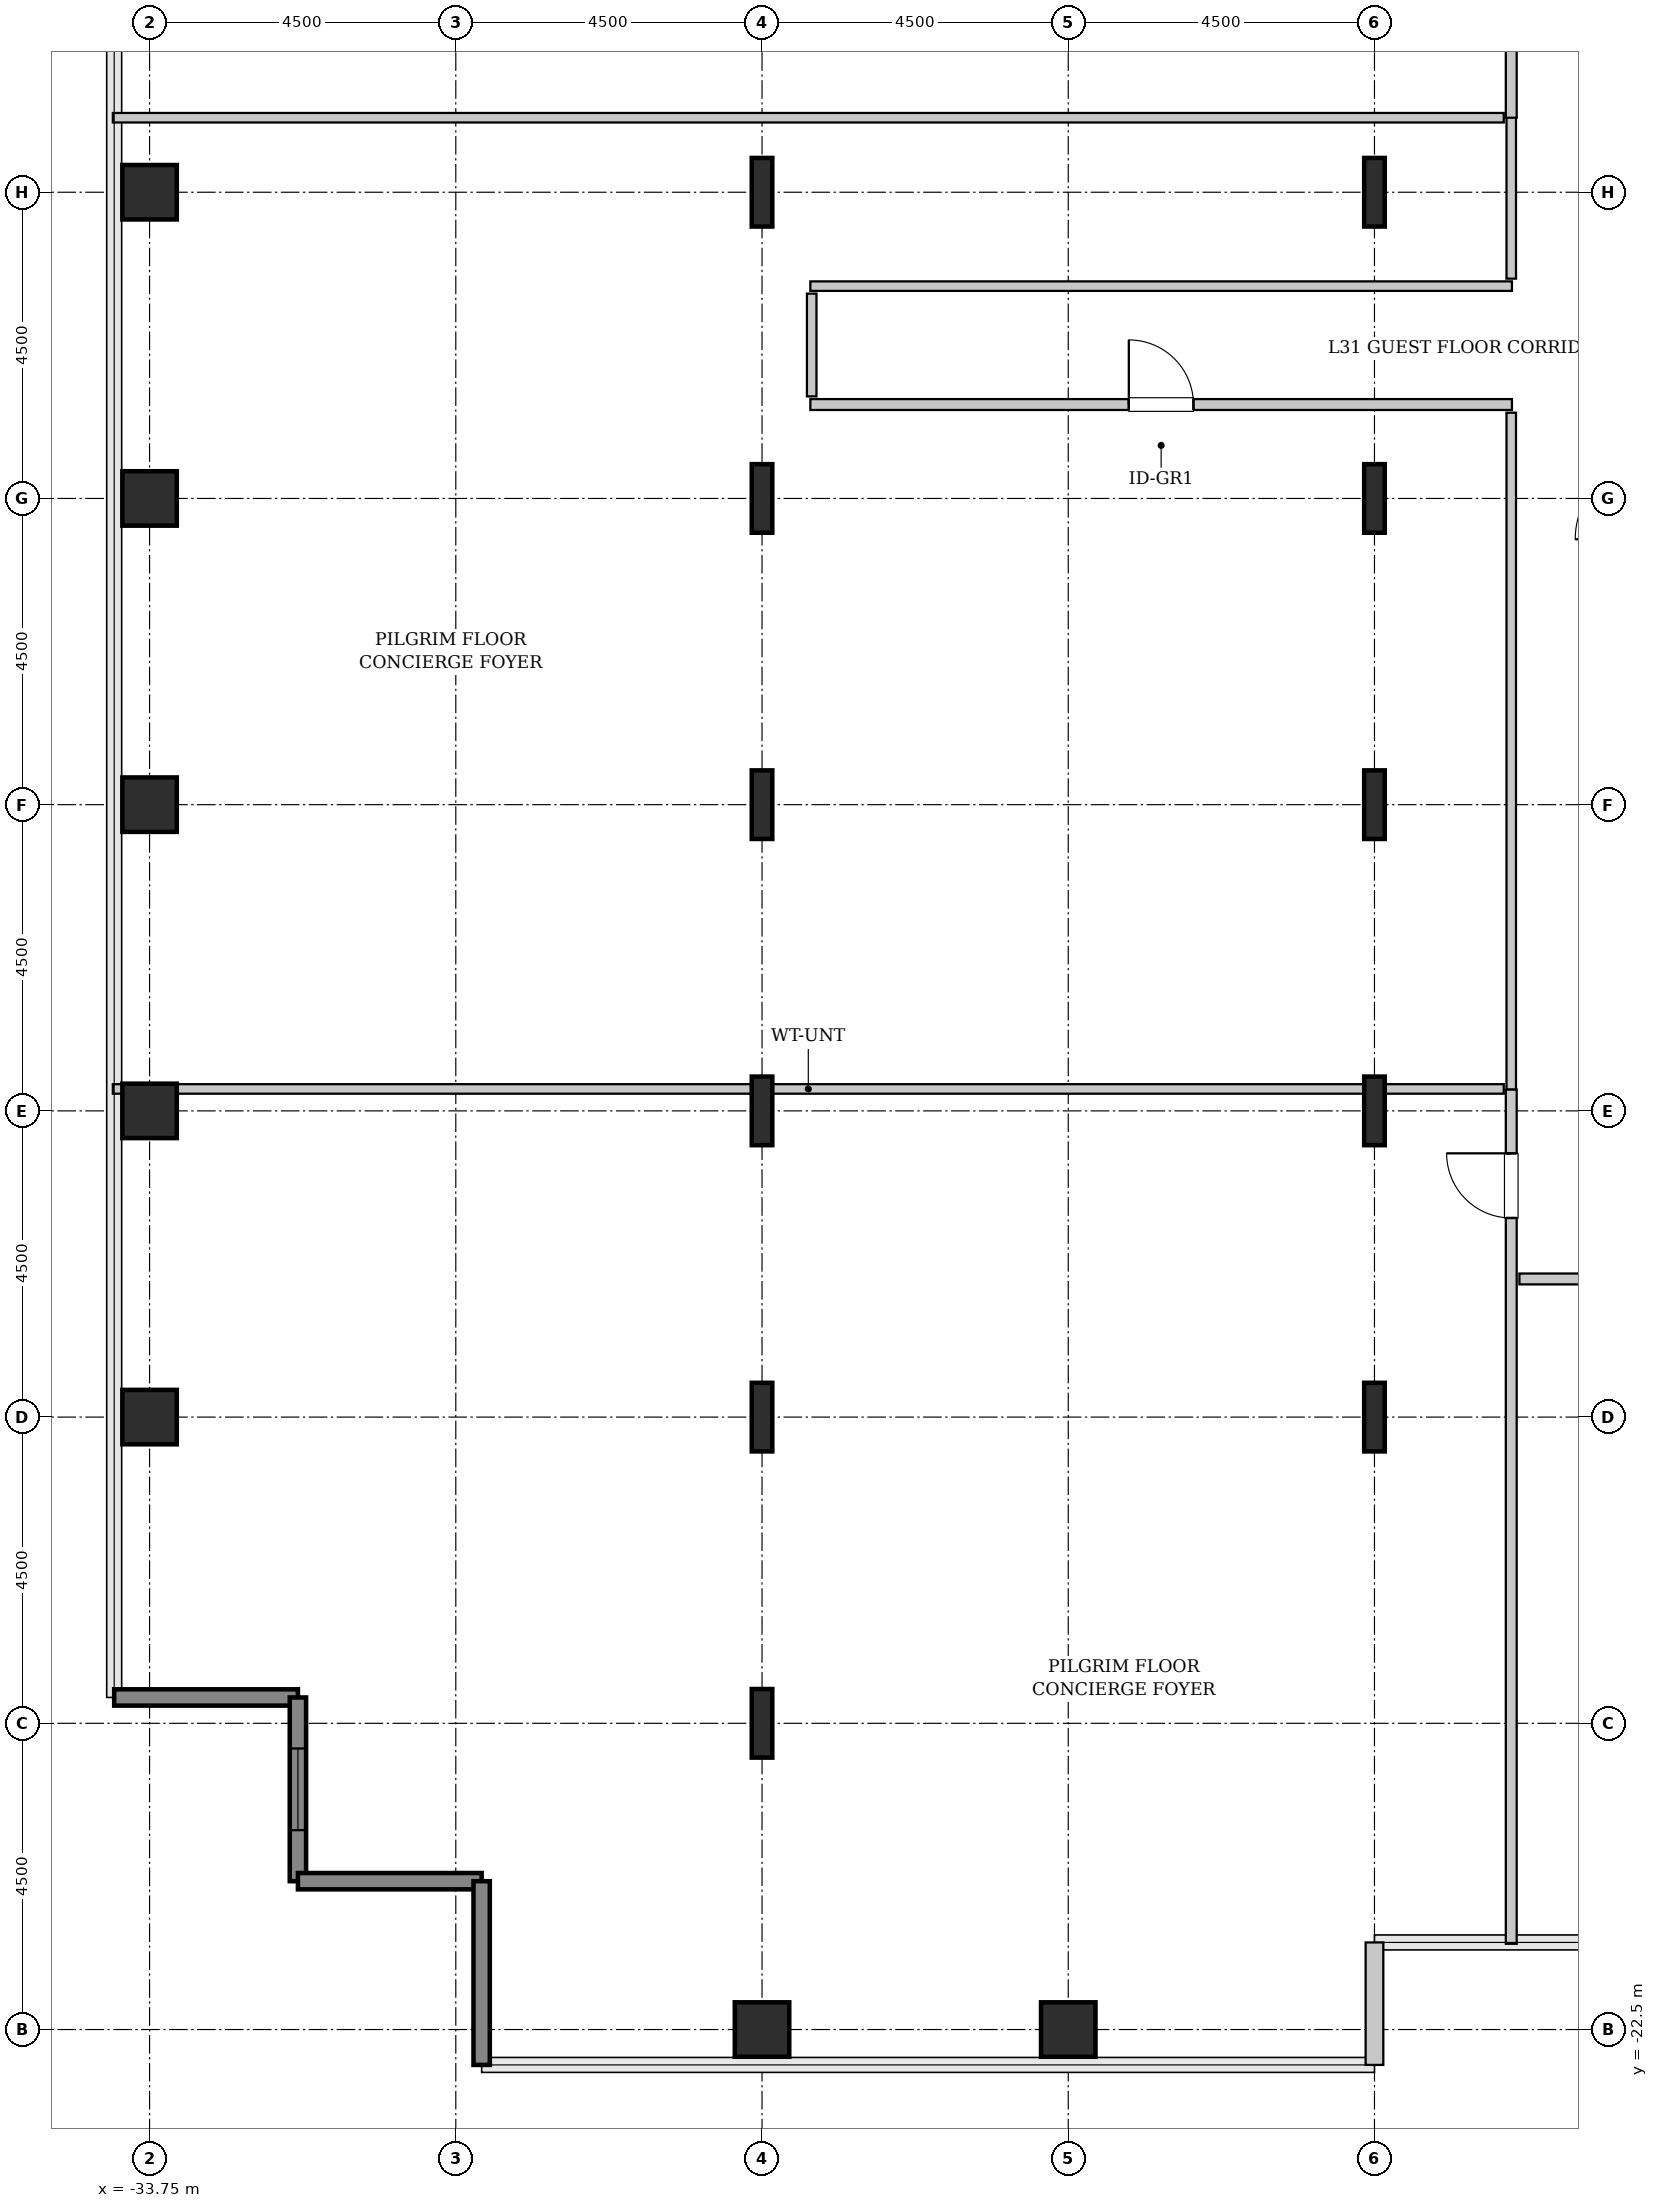
"""IFC4 building model, lengths in metres.
Left out: names, types, materials, properties, quantities, classifications, styles, units other than length and angle.
Written with IfcOpenShell. Run it as: python <this file> out.ifc"""

import sys

from ifc_helpers import new_model, si_unit, direction, frame, frame_2d, origin, origin_2d, place, context, subcontext, project, spatial, rectangle, hollow_rectangle, i_section, extrude, source, transform, mapped, element, fill, save


model = new_model("IFC4")
c1 = context("Model", 3, precision=1e-05, world=origin(), true_north=direction((0.0, 1.0)))
c2 = subcontext(c1, "Body", "Model", "MODEL_VIEW")
j1 = project(units=[si_unit("LENGTHUNIT", "METRE"), si_unit("PLANEANGLEUNIT", "RADIAN")], contexts=[c1])
p1 = place(None, origin())
s1 = spatial("IfcSite", under=j1, at=p1, CompositionType="ELEMENT")
p2 = place(p1, origin())
s2 = spatial("IfcBuilding", under=s1, at=p2, CompositionType="ELEMENT")
p3 = place(p2, frame((0.0, 0.0, 128.8)))
s3 = spatial("IfcBuildingStorey", under=s2, at=p3, CompositionType="ELEMENT", Elevation=128.8)
m1 = source(origin(), c2, "Body", "SweptSolid", [
    extrude(hollow_rectangle(XDim=0.8, YDim=0.8, WallThickness=0.04, InnerFilletRadius=0.04, OuterFilletRadius=0.08, at=origin_2d()), origin(), (0.0, 0.0, 1.0), 3.8),
])
for number, where, z_axis, x_axis in (
    (1, (-33.75, -13.5, 0.0), (0.0, 0.0, 1.0), (1.0, 0.0, 0.0)),
    (2, (-33.75, -9.0, 0.0), (0.0, 0.0, 1.0), (1.0, 0.0, 0.0)),
    (3, (-33.75, -4.5, 0.0), (0.0, 0.0, 1.0), (1.0, 0.0, 0.0)),
    (4, (-33.75, 0.0, 0.0), (0.0, 0.0, 1.0), (1.0, 0.0, 0.0)),
    (5, (-33.75, 4.5, 0.0), (0.0, 0.0, 1.0), (1.0, 0.0, 0.0)),
    (6, (-24.75, -22.5, 0.0), (0.0, 0.0, 1.0), (1.0, 0.0, 0.0)),
):
    element("IfcColumn", number, at=place(p3, frame(where, z_axis=z_axis, x_axis=x_axis)), inside=s3, PredefinedType="COLUMN", context=c2, shape_type="MappedRepresentation", body=[
        mapped(m1, transform((0.0, 0.0, 0.0), x_axis=(1.0, 0.0, 0.0), y_axis=(0.0, 1.0, 0.0), z_axis=(0.0, 0.0, 1.0), scale=1.0)),
    ])
m2 = source(origin(), c2, "Body", "SweptSolid", [
    extrude(i_section(OverallWidth=0.302, OverallDepth=1.008, WebThickness=0.021, FlangeThickness=0.04, FilletRadius=0.03, at=origin_2d()), origin(), (0.0, 0.0, 1.0), 3.8),
])
for number, where, z_axis, x_axis in (
    (7, (-24.75, -18.0, 0.0), (0.0, 0.0, 1.0), (1.0, 0.0, 0.0)),
    (8, (-24.75, -13.5, 0.0), (0.0, 0.0, 1.0), (1.0, 0.0, 0.0)),
    (9, (-24.75, -9.0, 0.0), (0.0, 0.0, 1.0), (1.0, 0.0, 0.0)),
    (10, (-24.75, -4.5, 0.0), (0.0, 0.0, 1.0), (1.0, 0.0, 0.0)),
    (11, (-24.75, 0.0, 0.0), (0.0, 0.0, 1.0), (1.0, 0.0, 0.0)),
    (12, (-24.75, 4.5, 0.0), (0.0, 0.0, 1.0), (1.0, 0.0, 0.0)),
):
    element("IfcColumn", number, at=place(p3, frame(where, z_axis=z_axis, x_axis=x_axis)), inside=s3, PredefinedType="COLUMN", context=c2, shape_type="MappedRepresentation", body=[
        mapped(m2, transform((0.0, 0.0, 0.0), x_axis=(1.0, 0.0, 0.0), y_axis=(0.0, 1.0, 0.0), z_axis=(0.0, 0.0, 1.0), scale=1.0)),
    ])
p4 = place(p3, frame((-20.25, -22.5, 0.0), z_axis=(0.0, 0.0, 1.0), x_axis=(1.0, 0.0, 0.0)))
e13 = element("IfcColumn", 13, at=p4, inside=s3, PredefinedType="COLUMN", context=c2, shape_type="MappedRepresentation", body=[
    mapped(m1, transform((0.0, 0.0, 0.0), x_axis=(1.0, 0.0, 0.0), y_axis=(0.0, 1.0, 0.0), z_axis=(0.0, 0.0, 1.0), scale=1.0)),
])
for number, where, z_axis, x_axis in (
    (14, (-15.75, -13.5, 0.0), (0.0, 0.0, 1.0), (1.0, 0.0, 0.0)),
    (15, (-15.75, -9.0, 0.0), (0.0, 0.0, 1.0), (1.0, 0.0, 0.0)),
    (16, (-15.75, -4.5, 0.0), (0.0, 0.0, 1.0), (1.0, 0.0, 0.0)),
    (17, (-15.75, 0.0, 0.0), (0.0, 0.0, 1.0), (1.0, 0.0, 0.0)),
    (18, (-15.75, 4.5, 0.0), (0.0, 0.0, 1.0), (1.0, 0.0, 0.0)),
):
    element("IfcColumn", number, at=place(p3, frame(where, z_axis=z_axis, x_axis=x_axis)), inside=s3, PredefinedType="COLUMN", context=c2, shape_type="MappedRepresentation", body=[
        mapped(m2, transform((0.0, 0.0, 0.0), x_axis=(1.0, 0.0, 0.0), y_axis=(0.0, 1.0, 0.0), z_axis=(0.0, 0.0, 1.0), scale=1.0)),
    ])
m3 = source(origin(), c2, "Body", "SweptSolid", [
    extrude(rectangle(XDim=2.7, YDim=0.24, at=frame_2d((1.35, 0.0))), origin(), (0.0, 0.0, 1.0), 3.55),
])
p5 = place(p3, frame((-34.27, -17.62, 0.0), z_axis=(0.0, 0.0, 1.0), x_axis=(1.0, 0.0, 0.0)))
e19 = element("IfcWall", 19, at=p5, inside=s3, PredefinedType="SHEAR", context=c2, shape_type="MappedRepresentation", body=[
    mapped(m3, transform((0.0, 0.0, 0.0), x_axis=(1.0, 0.0, 0.0), y_axis=(0.0, 1.0, 0.0), z_axis=(0.0, 0.0, 1.0), scale=1.0)),
])
p6 = place(p3, frame((-31.57, -17.62, 0.0), z_axis=(0.0, 0.0, 1.0), x_axis=(0.0, -1.0, 0.0)))
e20 = element("IfcWall", 20, at=p6, inside=s3, PredefinedType="SHEAR", context=c2, shape_type="MappedRepresentation", body=[
    mapped(m3, transform((0.0, 0.0, 0.0), x_axis=(1.0, 0.0, 0.0), y_axis=(0.0, 1.0, 0.0), z_axis=(0.0, 0.0, 1.0), scale=1.0)),
])
p7 = place(p6, frame((0.75, 0.0, 0.85)))
e21 = element("IfcOpeningElement", 21, at=p7, cuts=e20, PredefinedType="OPENING", context=c2, shape_type="SweptSolid", body=[
    extrude(rectangle(XDim=1.2, YDim=1.8, at=frame_2d((0.6, 0.9))), frame((0.0, 0.13, 0.0), z_axis=(0.0, -1.0, 0.0), x_axis=(1.0, 0.0, 0.0)), (0.0, 0.0, 1.0), 0.26),
])
for number, where, z_axis, x_axis in (
    (22, (-31.57, -20.32, 0.0), (0.0, 0.0, 1.0), (1.0, 0.0, 0.0)),
    (23, (-28.87, -20.32, 0.0), (0.0, 0.0, 1.0), (0.0, -1.0, 0.0)),
):
    element("IfcWall", number, at=place(p3, frame(where, z_axis=z_axis, x_axis=x_axis)), inside=s3, PredefinedType="SHEAR", context=c2, shape_type="MappedRepresentation", body=[
        mapped(m3, transform((0.0, 0.0, 0.0), x_axis=(1.0, 0.0, 0.0), y_axis=(0.0, 1.0, 0.0), z_axis=(0.0, 0.0, 1.0), scale=1.0)),
    ])
m4 = source(origin(), c2, "Body", "SweptSolid", [
    extrude(rectangle(XDim=1.8, YDim=0.26, at=frame_2d((0.9, 0.0))), origin(), (0.0, 0.0, 1.0), 3.55),
])
p8 = place(p3, frame((-15.75, -23.02, 0.0), z_axis=(0.0, 0.0, 1.0), x_axis=(0.0, 1.0, 0.0)))
e24 = element("IfcWall", 24, at=p8, inside=s3, PredefinedType="SOLIDWALL", context=c2, shape_type="MappedRepresentation", body=[
    mapped(m4, transform((0.0, 0.0, 0.0), x_axis=(1.0, 0.0, 0.0), y_axis=(0.0, 1.0, 0.0), z_axis=(0.0, 0.0, 1.0), scale=1.0)),
])
m5 = source(origin(), c2, "Body", "SweptSolid", [
    extrude(rectangle(XDim=10.31, YDim=0.16, at=frame_2d((5.155, 0.0))), origin(), (0.0, 0.0, 1.0), 3.535),
])
p9 = place(p3, frame((-24.04, 1.38, 0.0), z_axis=(0.0, 0.0, 1.0), x_axis=(1.0, 0.0, 0.0)))
e25 = element("IfcWall", 25, at=p9, inside=s3, PredefinedType="PARTITIONING", context=c2, shape_type="MappedRepresentation", body=[
    mapped(m5, transform((0.0, 0.0, 0.0), x_axis=(1.0, 0.0, 0.0), y_axis=(0.0, 1.0, 0.0), z_axis=(0.0, 0.0, 1.0), scale=1.0)),
])
p10 = place(p9, frame((4.68, 0.0, 0.0)))
e26 = element("IfcOpeningElement", 26, at=p10, cuts=e25, PredefinedType="OPENING", context=c2, shape_type="SweptSolid", body=[
    extrude(rectangle(XDim=0.95, YDim=2.1, at=frame_2d((0.475, 1.05))), frame((0.0, 0.09, 0.0), z_axis=(0.0, -1.0, 0.0), x_axis=(1.0, 0.0, 0.0)), (0.0, 0.0, 1.0), 0.18),
])
m6 = source(origin(), c2, "Body", "SweptSolid", [
    extrude(rectangle(XDim=10.31, YDim=0.14, at=frame_2d((5.155, 0.0))), origin(), (0.0, 0.0, 1.0), 3.535),
])
p11 = place(p3, frame((-24.04, 3.12, 0.0), z_axis=(0.0, 0.0, 1.0), x_axis=(1.0, 0.0, 0.0)))
e27 = element("IfcWall", 27, at=p11, inside=s3, PredefinedType="PARTITIONING", context=c2, shape_type="MappedRepresentation", body=[
    mapped(m6, transform((0.0, 0.0, 0.0), x_axis=(1.0, 0.0, 0.0), y_axis=(0.0, 1.0, 0.0), z_axis=(0.0, 0.0, 1.0), scale=1.0)),
])
m7 = source(origin(), c2, "Body", "SweptSolid", [
    extrude(rectangle(XDim=9.948, YDim=0.14, at=frame_2d((4.974, 0.0))), origin(), (0.0, 0.0, 1.0), 3.535),
])
p12 = place(p3, frame((-13.74, -8.688, 0.0), z_axis=(0.0, 0.0, 1.0), x_axis=(0.0, 1.0, 0.0)))
e28 = element("IfcWall", 28, at=p12, inside=s3, PredefinedType="PARTITIONING", context=c2, shape_type="MappedRepresentation", body=[
    mapped(m7, transform((0.0, 0.0, 0.0), x_axis=(1.0, 0.0, 0.0), y_axis=(0.0, 1.0, 0.0), z_axis=(0.0, 0.0, 1.0), scale=1.0)),
])
m8 = source(origin(), c2, "Body", "SweptSolid", [
    extrude(rectangle(XDim=2.375, YDim=0.14, at=frame_2d((1.188, 0.0))), origin(), (0.0, 0.0, 1.0), 3.535),
])
p13 = place(p3, frame((-13.74, 3.23, 0.0), z_axis=(0.0, 0.0, 1.0), x_axis=(0.0, 1.0, 0.0)))
e29 = element("IfcWall", 29, at=p13, inside=s3, PredefinedType="PARTITIONING", context=c2, shape_type="MappedRepresentation", body=[
    mapped(m8, transform((0.0, 0.0, 0.0), x_axis=(1.0, 0.0, 0.0), y_axis=(0.0, 1.0, 0.0), z_axis=(0.0, 0.0, 1.0), scale=1.0)),
])
m9 = source(origin(), c2, "Body", "SweptSolid", [
    extrude(rectangle(XDim=1.51, YDim=0.14, at=frame_2d((0.755, 0.0))), origin(), (0.0, 0.0, 1.0), 3.535),
])
p14 = place(p3, frame((-24.02, 1.5, 0.0), z_axis=(0.0, 0.0, 1.0), x_axis=(0.0, 1.0, 0.0)))
e30 = element("IfcWall", 30, at=p14, inside=s3, PredefinedType="PARTITIONING", context=c2, shape_type="MappedRepresentation", body=[
    mapped(m9, transform((0.0, 0.0, 0.0), x_axis=(1.0, 0.0, 0.0), y_axis=(0.0, 1.0, 0.0), z_axis=(0.0, 0.0, 1.0), scale=1.0)),
])
m10 = source(origin(), c2, "Body", "SweptSolid", [
    extrude(rectangle(XDim=20.44, YDim=0.14, at=frame_2d((10.22, 0.0))), origin(), (0.0, 0.0, 1.0), 2.875),
])
p15 = place(p3, frame((-34.29, -8.677, 0.0), z_axis=(0.0, 0.0, 1.0), x_axis=(1.0, 0.0, 0.0)))
e31 = element("IfcWall", 31, at=p15, inside=s3, PredefinedType="PARTITIONING", context=c2, shape_type="MappedRepresentation", body=[
    mapped(m10, transform((0.0, 0.0, 0.0), x_axis=(1.0, 0.0, 0.0), y_axis=(0.0, 1.0, 0.0), z_axis=(0.0, 0.0, 1.0), scale=1.0)),
])
m11 = source(origin(), c2, "Body", "SweptSolid", [
    extrude(rectangle(XDim=20.44, YDim=0.14, at=frame_2d((10.22, 0.0))), origin(), (0.0, 0.0, 1.0), 3.535),
])
p16 = place(p3, frame((-34.29, 5.595, 0.0), z_axis=(0.0, 0.0, 1.0), x_axis=(1.0, 0.0, 0.0)))
e32 = element("IfcWall", 32, at=p16, inside=s3, PredefinedType="PARTITIONING", context=c2, shape_type="MappedRepresentation", body=[
    mapped(m11, transform((0.0, 0.0, 0.0), x_axis=(1.0, 0.0, 0.0), y_axis=(0.0, 1.0, 0.0), z_axis=(0.0, 0.0, 1.0), scale=1.0)),
])
m12 = source(origin(), c2, "Body", "SweptSolid", [
    extrude(rectangle(XDim=12.552, YDim=0.16, at=frame_2d((6.276, 0.0))), origin(), (0.0, 0.0, 1.0), 3.535),
])
p17 = place(p3, frame((-13.74, -21.24, 0.0), z_axis=(0.0, 0.0, 1.0), x_axis=(0.0, 1.0, 0.0)))
e33 = element("IfcWall", 33, at=p17, inside=s3, PredefinedType="PARTITIONING", context=c2, shape_type="MappedRepresentation", body=[
    mapped(m12, transform((0.0, 0.0, 0.0), x_axis=(1.0, 0.0, 0.0), y_axis=(0.0, 1.0, 0.0), z_axis=(0.0, 0.0, 1.0), scale=1.0)),
])
p18 = place(p17, frame((10.666, 0.0, 0.0)))
e34 = element("IfcOpeningElement", 34, at=p18, cuts=e33, PredefinedType="OPENING", context=c2, shape_type="SweptSolid", body=[
    extrude(rectangle(XDim=0.95, YDim=2.1, at=frame_2d((0.475, 1.05))), frame((0.0, 0.09, 0.0), z_axis=(0.0, -1.0, 0.0), x_axis=(1.0, 0.0, 0.0)), (0.0, 0.0, 1.0), 0.18),
])
m13 = source(origin(), c2, "Body", "SweptSolid", [
    extrude(rectangle(XDim=15.645, YDim=0.16, at=frame_2d((7.823, 0.0))), origin(), (0.0, 0.0, 1.0), 3.535),
])
p19 = place(p3, frame((-13.74, 5.595, 0.0), z_axis=(0.0, 0.0, 1.0), x_axis=(0.0, 1.0, 0.0)))
e35 = element("IfcWall", 35, at=p19, inside=s3, PredefinedType="PARTITIONING", context=c2, shape_type="MappedRepresentation", body=[
    mapped(m13, transform((0.0, 0.0, 0.0), x_axis=(1.0, 0.0, 0.0), y_axis=(0.0, 1.0, 0.0), z_axis=(0.0, 0.0, 1.0), scale=1.0)),
])
p20 = place(p19, frame((2.482, 0.0, 0.0)))
e36 = element("IfcOpeningElement", 36, at=p20, cuts=e35, PredefinedType="OPENING", context=c2, shape_type="SweptSolid", body=[
    extrude(rectangle(XDim=0.95, YDim=2.1, at=frame_2d((0.475, 1.05))), frame((0.0, 0.09, 0.0), z_axis=(0.0, -1.0, 0.0), x_axis=(1.0, 0.0, 0.0)), (0.0, 0.0, 1.0), 0.18),
])
m14 = source(origin(), c2, "Body", "SweptSolid", [
    extrude(rectangle(XDim=6.225, YDim=0.16, at=frame_2d((3.113, 0.0))), origin(), (0.0, 0.0, 1.0), 3.535),
])
p21 = place(p3, frame((-13.62, -11.47, 0.0), z_axis=(0.0, 0.0, 1.0), x_axis=(1.0, 0.0, 0.0)))
e37 = element("IfcWall", 37, at=p21, inside=s3, PredefinedType="PARTITIONING", context=c2, shape_type="MappedRepresentation", body=[
    mapped(m14, transform((0.0, 0.0, 0.0), x_axis=(1.0, 0.0, 0.0), y_axis=(0.0, 1.0, 0.0), z_axis=(0.0, 0.0, 1.0), scale=1.0)),
])
p22 = place(p21, frame((2.637, 0.0, 0.0)))
e38 = element("IfcOpeningElement", 38, at=p22, cuts=e37, PredefinedType="OPENING", context=c2, shape_type="SweptSolid", body=[
    extrude(rectangle(XDim=0.95, YDim=2.1, at=frame_2d((0.475, 1.05))), frame((0.0, 0.09, 0.0), z_axis=(0.0, -1.0, 0.0), x_axis=(1.0, 0.0, 0.0)), (0.0, 0.0, 1.0), 0.18),
])
m15 = source(origin(), c2, "Body", "SweptSolid", [
    extrude(rectangle(XDim=1.2, YDim=1.8, at=frame_2d((0.6, 0.9))), frame((0.0, 0.03, 0.0), z_axis=(0.0, -1.0, 0.0), x_axis=(1.0, 0.0, 0.0)), (0.0, 0.0, 1.0), 0.06),
])
p23 = place(p7, origin())
e39 = element("IfcWindow", 39, at=p23, inside=s3, PartitioningType="SINGLE_PANEL", PredefinedType="WINDOW", context=c2, shape_type="MappedRepresentation", body=[
    mapped(m15, transform((0.0, 0.0, 0.0), x_axis=(1.0, 0.0, 0.0), y_axis=(0.0, 1.0, 0.0), z_axis=(0.0, 0.0, 1.0), scale=1.0)),
])
fill(e21, e39)
m16 = source(origin(), c2, "Body", "SweptSolid", [
    extrude(rectangle(XDim=0.95, YDim=2.1, at=frame_2d((0.475, 1.05))), frame((0.0, 0.025, 0.0), z_axis=(0.0, -1.0, 0.0), x_axis=(1.0, 0.0, 0.0)), (0.0, 0.0, 1.0), 0.05),
])
p24 = place(p10, origin())
e40 = element("IfcDoor", 40, at=p24, inside=s3, OperationType="SINGLE_SWING_LEFT", PredefinedType="DOOR", context=c2, shape_type="MappedRepresentation", body=[
    mapped(m16, transform((0.0, 0.0, 0.0), x_axis=(1.0, 0.0, 0.0), y_axis=(0.0, 1.0, 0.0), z_axis=(0.0, 0.0, 1.0), scale=1.0)),
])
fill(e26, e40)
p25 = place(p18, origin())
e41 = element("IfcDoor", 41, at=p25, inside=s3, OperationType="SINGLE_SWING_RIGHT", PredefinedType="DOOR", context=c2, shape_type="MappedRepresentation", body=[
    mapped(m16, transform((0.0, 0.0, 0.0), x_axis=(1.0, 0.0, 0.0), y_axis=(0.0, 1.0, 0.0), z_axis=(0.0, 0.0, 1.0), scale=1.0)),
])
fill(e34, e41)
save(model, sys.argv[1])
